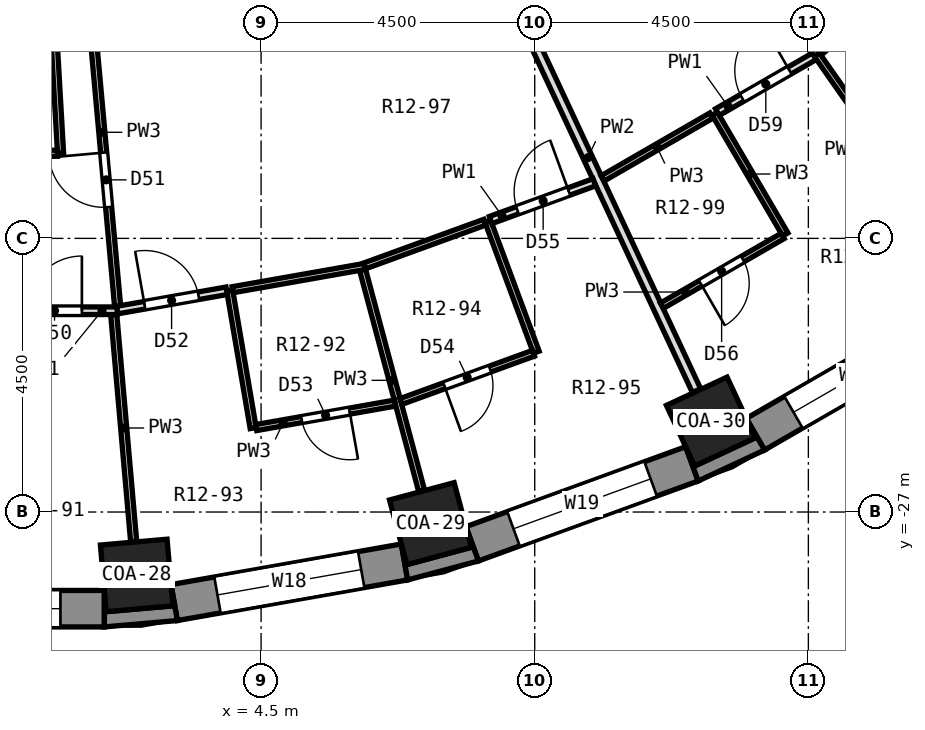
"""IFC4 building model, lengths in metres.
Left out: names, types, materials, properties, quantities, classifications, styles, units other than length and angle.
Written with IfcOpenShell. Run it as: python <this file> out.ifc"""

import sys

from ifc_helpers import new_model, si_unit, direction, frame, frame_2d, origin, origin_2d, place, context, subcontext, project, spatial, polyline, rectangle, outline, extrude, element, fill, save


model = new_model("IFC4")
c1 = context("Model", 3, precision=1e-05, world=origin(), true_north=direction((0.0, 1.0)))
c2 = subcontext(c1, "Body", "Model", "MODEL_VIEW")
j1 = project(units=[si_unit("LENGTHUNIT", "METRE"), si_unit("PLANEANGLEUNIT", "RADIAN")], contexts=[c1])
p1 = place(None, origin())
s1 = spatial("IfcSite", under=j1, at=p1, CompositionType="ELEMENT")
p2 = place(p1, origin())
s2 = spatial("IfcBuilding", under=s1, at=p2, CompositionType="ELEMENT")
p3 = place(p2, frame((0.0, 0.0, 56.0)))
s3 = spatial("IfcBuildingStorey", under=s2, at=p3, CompositionType="ELEMENT", Elevation=56.0)
for number, where, z_axis, x_axis in (
    (1, (2.453, -28.043, 0.0), (0.0, 0.0, 1.0), (0.087, -0.996, 0.0)),
    (2, (7.286, -27.191, 0.0), (0.0, 0.0, 1.0), (0.259, -0.966, 0.0)),
    (3, (11.897, -25.512, 0.0), (0.0, 0.0, 1.0), (0.423, -0.906, 0.0)),
):
    element("IfcColumn", number, at=place(p3, frame(where, z_axis=z_axis, x_axis=x_axis)), inside=s3, PredefinedType="COLUMN", context=c2, shape_type="SweptSolid", body=[
        extrude(rectangle(XDim=1.1, YDim=1.1, at=origin_2d()), origin(), (0.0, 0.0, 1.0), 3.3),
    ])
p4 = place(p3, frame((-1.923, -28.59, 0.0), z_axis=(0.0, 0.0, 1.0), x_axis=(1.0, 0.0, 0.0)))
e4 = element("IfcWall", 4, at=p4, inside=s3, PredefinedType="SOLIDWALL", context=c2, shape_type="SweptSolid", body=[
    extrude(rectangle(XDim=3.846, YDim=0.6, at=frame_2d((1.923, 0.0))), origin(), (0.0, 0.0, 1.0), 2.75),
])
p5 = place(p4, frame((0.723, 0.0, 0.9)))
e5 = element("IfcOpeningElement", 5, at=p5, cuts=e4, PredefinedType="OPENING", context=c2, shape_type="SweptSolid", body=[
    extrude(rectangle(XDim=2.4, YDim=1.8, at=frame_2d((1.2, 0.9))), frame((0.0, 0.312, 0.0), z_axis=(0.0, -1.0, 0.0), x_axis=(1.0, 0.0, 0.0)), (0.0, 0.0, 1.0), 0.624),
])
p6 = place(p3, frame((3.071, -28.489, 0.0), z_axis=(0.0, 0.0, 1.0), x_axis=(0.984800809218, 0.173687553279, 0.0)))
e6 = element("IfcWall", 6, at=p6, inside=s3, PredefinedType="SOLIDWALL", context=c2, shape_type="SweptSolid", body=[
    extrude(rectangle(XDim=3.846, YDim=0.6, at=frame_2d((1.923, 0.0))), origin(), (0.0, 0.0, 1.0), 2.75),
])
p7 = place(p6, frame((0.723, 0.0, 0.9)))
e7 = element("IfcOpeningElement", 7, at=p7, cuts=e6, PredefinedType="OPENING", context=c2, shape_type="SweptSolid", body=[
    extrude(rectangle(XDim=2.4, YDim=1.8, at=frame_2d((1.2, 0.9))), frame((0.0, 0.312, 0.0), z_axis=(0.0, -1.0, 0.0), x_axis=(1.0, 0.0, 0.0)), (0.0, 0.0, 1.0), 0.624),
])
p8 = place(p3, frame((7.971, -27.523, 0.0), z_axis=(0.0, 0.0, 1.0), x_axis=(0.939689588564, 0.342028474173, 0.0)))
e8 = element("IfcWall", 8, at=p8, inside=s3, PredefinedType="SOLIDWALL", context=c2, shape_type="SweptSolid", body=[
    extrude(rectangle(XDim=3.846, YDim=0.6, at=frame_2d((1.923, 0.0))), origin(), (0.0, 0.0, 1.0), 2.75),
])
p9 = place(p8, frame((0.723, 0.0, 0.9)))
e9 = element("IfcOpeningElement", 9, at=p9, cuts=e8, PredefinedType="OPENING", context=c2, shape_type="SweptSolid", body=[
    extrude(rectangle(XDim=2.4, YDim=1.8, at=frame_2d((1.2, 0.9))), frame((0.0, 0.312, 0.0), z_axis=(0.0, -1.0, 0.0), x_axis=(1.0, 0.0, 0.0)), (0.0, 0.0, 1.0), 0.624),
])
p10 = place(p3, frame((12.63, -25.721, 0.0), z_axis=(0.0, 0.0, 1.0), x_axis=(0.86603124159, 0.499989888488, 0.0)))
e10 = element("IfcWall", 10, at=p10, inside=s3, PredefinedType="SOLIDWALL", context=c2, shape_type="SweptSolid", body=[
    extrude(rectangle(XDim=3.846, YDim=0.6, at=frame_2d((1.923, 0.0))), origin(), (0.0, 0.0, 1.0), 2.75),
])
p11 = place(p10, frame((0.723, 0.0, 0.9)))
e11 = element("IfcOpeningElement", 11, at=p11, cuts=e10, PredefinedType="OPENING", context=c2, shape_type="SweptSolid", body=[
    extrude(rectangle(XDim=2.4, YDim=1.8, at=frame_2d((1.2, 0.9))), frame((0.0, 0.312, 0.0), z_axis=(0.0, -1.0, 0.0), x_axis=(1.0, 0.0, 0.0)), (0.0, 0.0, 1.0), 0.624),
])
p12 = place(p3, origin())
e12 = element("IfcWall", 12, at=p12, inside=s3, PredefinedType="SOLIDWALL", context=c2, shape_type="SweptSolid", body=[
    extrude(outline(polyline([(1.923, -28.89), (3.123, -28.785), (3.019, -28.194), (3.049, -28.543), (1.954, -28.639), (1.923, -28.29), (1.923, -28.89)])), origin(), (0.0, 0.0, 1.0), 2.75),
])
p13 = place(p3, origin())
e13 = element("IfcWall", 13, at=p13, inside=s3, PredefinedType="SOLIDWALL", context=c2, shape_type="SweptSolid", body=[
    extrude(outline(polyline([(6.91, -28.117), (8.074, -27.805), (7.869, -27.241), (7.959, -27.58), (6.897, -27.865), (6.806, -27.526), (6.91, -28.117)])), origin(), (0.0, 0.0, 1.0), 2.75),
])
p14 = place(p3, origin())
e14 = element("IfcWall", 14, at=p14, inside=s3, PredefinedType="SOLIDWALL", context=c2, shape_type="SweptSolid", body=[
    extrude(outline(polyline([(12.78, -25.981), (12.479, -25.461), (12.628, -25.779), (11.631, -26.243), (11.483, -25.926), (11.688, -26.49), (12.78, -25.981)])), origin(), (0.0, 0.0, 1.0), 2.75),
])
p15 = place(p3, frame((1.085, -19.062, 0.0), z_axis=(0.0, 0.0, 1.0), x_axis=(0.057060010535, -0.998370750372, 0.0)))
e15 = element("IfcWall", 15, at=p15, inside=s3, PredefinedType="PARTITIONING", context=c2, shape_type="SweptSolid", body=[
    extrude(rectangle(XDim=2.041, YDim=0.1, at=frame_2d((1.021, 0.0))), origin(), (0.0, 0.0, 1.0), 2.75),
])
p16 = place(p3, frame((2.077, -23.752, 0.0), z_axis=(0.0, 0.0, 1.0), x_axis=(0.087439331166, -0.996169846645, 0.0)))
e16 = element("IfcWall", 16, at=p16, inside=s3, PredefinedType="PARTITIONING", context=c2, shape_type="SweptSolid", body=[
    extrude(rectangle(XDim=3.747, YDim=0.1, at=frame_2d((1.874, 0.0))), origin(), (0.0, 0.0, 1.0), 2.75),
])
p17 = place(p3, frame((1.728, -19.062, 0.0), z_axis=(0.0, 0.0, 1.0), x_axis=(0.090314228744, -0.995913319565, 0.0)))
e17 = element("IfcWall", 17, at=p17, inside=s3, PredefinedType="PARTITIONING", context=c2, shape_type="SweptSolid", body=[
    extrude(rectangle(XDim=4.571, YDim=0.1, at=frame_2d((2.286, 0.0))), origin(), (0.0, 0.0, 1.0), 2.75),
])
p18 = place(p17, frame((2.036, 0.0, 0.0)))
e18 = element("IfcOpeningElement", 18, at=p18, cuts=e17, PredefinedType="OPENING", context=c2, shape_type="SweptSolid", body=[
    extrude(rectangle(XDim=0.9, YDim=2.1, at=frame_2d((0.45, 1.05))), frame((0.0, 0.062, 0.0), z_axis=(0.0, -1.0, 0.0), x_axis=(1.0, 0.0, 0.0)), (0.0, 0.0, 1.0), 0.124),
])
p19 = place(p3, frame((3.983, -23.353, 0.0), z_axis=(0.0, 0.0, 1.0), x_axis=(0.168356840278, -0.985726115273, 0.0)))
e19 = element("IfcWall", 19, at=p19, inside=s3, PredefinedType="PARTITIONING", context=c2, shape_type="SweptSolid", body=[
    extrude(rectangle(XDim=2.3, YDim=0.1, at=frame_2d((1.15, 0.0))), origin(), (0.0, 0.0, 1.0), 2.75),
])
p20 = place(p3, frame((6.169, -23.018, 0.0), z_axis=(0.0, 0.0, 1.0), x_axis=(0.258074907141, -0.966124910301, 0.0)))
e20 = element("IfcWall", 20, at=p20, inside=s3, PredefinedType="PARTITIONING", context=c2, shape_type="SweptSolid", body=[
    extrude(rectangle(XDim=3.76, YDim=0.1, at=frame_2d((1.88, 0.0))), origin(), (0.0, 0.0, 1.0), 2.75),
])
p21 = place(p3, frame((8.227, -22.216, 0.0), z_axis=(0.0, 0.0, 1.0), x_axis=(0.347431936108, -0.937705204087, 0.0)))
e21 = element("IfcWall", 21, at=p21, inside=s3, PredefinedType="PARTITIONING", context=c2, shape_type="SweptSolid", body=[
    extrude(rectangle(XDim=2.299, YDim=0.1, at=frame_2d((1.15, 0.0))), origin(), (0.0, 0.0, 1.0), 2.75),
])
p22 = place(p3, frame((8.086, -17.343, 0.0), z_axis=(0.0, 0.0, 1.0), x_axis=(0.422898111985, -0.906177238116, 0.0)))
e22 = element("IfcWall", 22, at=p22, inside=s3, PredefinedType="PARTITIONING", context=c2, shape_type="SweptSolid", body=[
    extrude(rectangle(XDim=8.455, YDim=0.15, at=frame_2d((4.227, 0.0))), origin(), (0.0, 0.0, 1.0), 2.75),
])
p23 = place(p3, frame((11.96, -20.449, 0.0), z_axis=(0.0, 0.0, 1.0), x_axis=(0.504708754908, -0.863289680651, 0.0)))
e23 = element("IfcWall", 23, at=p23, inside=s3, PredefinedType="PARTITIONING", context=c2, shape_type="SweptSolid", body=[
    extrude(rectangle(XDim=2.301, YDim=0.1, at=frame_2d((1.15, 0.0))), origin(), (0.0, 0.0, 1.0), 2.75),
])
p24 = place(p3, frame((13.64, -19.48, 0.0), z_axis=(0.0, 0.0, 1.0), x_axis=(0.573574167811, -0.819153632733, 0.0)))
e24 = element("IfcWall", 24, at=p24, inside=s3, PredefinedType="PARTITIONING", context=c2, shape_type="SweptSolid", body=[
    extrude(rectangle(XDim=3.81, YDim=0.1, at=frame_2d((1.905, 0.0))), origin(), (0.0, 0.0, 1.0), 2.75),
])
p25 = place(p3, frame((0.183, -23.69, 0.0), z_axis=(0.0, 0.0, 1.0), x_axis=(1.0, 0.0, 0.0)))
e25 = element("IfcWall", 25, at=p25, inside=s3, PredefinedType="PARTITIONING", context=c2, shape_type="SweptSolid", body=[
    extrude(rectangle(XDim=1.953, YDim=0.125, at=frame_2d((0.977, 0.0))), origin(), (0.0, 0.0, 1.0), 2.75),
])
p26 = place(p25, frame((0.47, 0.0, 0.0)))
e26 = element("IfcOpeningElement", 26, at=p26, cuts=e25, PredefinedType="OPENING", context=c2, shape_type="SweptSolid", body=[
    extrude(rectangle(XDim=0.9, YDim=2.1, at=frame_2d((0.45, 1.05))), frame((0.0, 0.074, 0.0), z_axis=(0.0, -1.0, 0.0), x_axis=(1.0, 0.0, 0.0)), (0.0, 0.0, 1.0), 0.149),
])
p27 = place(p3, frame((-0.921, -21.1, 0.0), z_axis=(0.0, 0.0, 1.0), x_axis=(1.0, 0.0, 0.0)))
e27 = element("IfcWall", 27, at=p27, inside=s3, PredefinedType="PARTITIONING", context=c2, shape_type="SweptSolid", body=[
    extrude(rectangle(XDim=2.073, YDim=0.1, at=frame_2d((1.037, 0.0))), origin(), (0.0, 0.0, 1.0), 2.75),
])
p28 = place(p27, frame((0.662, 0.0, 0.0)))
e28 = element("IfcOpeningElement", 28, at=p28, cuts=e27, PredefinedType="OPENING", context=c2, shape_type="SweptSolid", body=[
    extrude(rectangle(XDim=0.8, YDim=2.1, at=frame_2d((0.4, 1.05))), frame((0.0, 0.062, 0.0), z_axis=(0.0, -1.0, 0.0), x_axis=(1.0, 0.0, 0.0)), (0.0, 0.0, 1.0), 0.124),
])
p29 = place(p3, frame((4.419, -25.611, 0.0), z_axis=(0.0, 0.0, 1.0), x_axis=(0.984814280308, 0.173611155466, 0.0)))
e29 = element("IfcWall", 29, at=p29, inside=s3, PredefinedType="PARTITIONING", context=c2, shape_type="SweptSolid", body=[
    extrude(rectangle(XDim=2.319, YDim=0.1, at=frame_2d((1.159, 0.0))), origin(), (0.0, 0.0, 1.0), 2.75),
])
p30 = place(p29, frame((0.76, 0.0, 0.0)))
e30 = element("IfcOpeningElement", 30, at=p30, cuts=e29, PredefinedType="OPENING", context=c2, shape_type="SweptSolid", body=[
    extrude(rectangle(XDim=0.8, YDim=2.1, at=frame_2d((0.4, 1.05))), frame((0.0, 0.062, 0.0), z_axis=(0.0, -1.0, 0.0), x_axis=(1.0, 0.0, 0.0)), (0.0, 0.0, 1.0), 0.124),
])
p31 = place(p3, frame((4.032, -23.344, 0.0), z_axis=(0.0, 0.0, 1.0), x_axis=(0.98481362095, 0.173614895648, 0.0)))
e31 = element("IfcWall", 31, at=p31, inside=s3, PredefinedType="PARTITIONING", context=c2, shape_type="SweptSolid", body=[
    extrude(rectangle(XDim=2.206, YDim=0.1, at=frame_2d((1.103, 0.0))), origin(), (0.0, 0.0, 1.0), 2.75),
])
p32 = place(p3, frame((2.135, -23.679, 0.0), z_axis=(0.0, 0.0, 1.0), x_axis=(0.984774141248, 0.173838691691, 0.0)))
e32 = element("IfcWall", 32, at=p32, inside=s3, PredefinedType="PARTITIONING", context=c2, shape_type="SweptSolid", body=[
    extrude(rectangle(XDim=1.827, YDim=0.125, at=frame_2d((0.914, 0.0))), origin(), (0.0, 0.0, 1.0), 2.75),
])
p33 = place(p32, frame((0.457, 0.0, 0.0)))
e33 = element("IfcOpeningElement", 33, at=p33, cuts=e32, PredefinedType="OPENING", context=c2, shape_type="SweptSolid", body=[
    extrude(rectangle(XDim=0.9, YDim=2.1, at=frame_2d((0.45, 1.05))), frame((0.0, 0.074, 0.0), z_axis=(0.0, -1.0, 0.0), x_axis=(1.0, 0.0, 0.0)), (0.0, 0.0, 1.0), 0.149),
])
p34 = place(p3, frame((6.799, -25.183, 0.0), z_axis=(0.0, 0.0, 1.0), x_axis=(0.939655079874, 0.342123268526, 0.0)))
e34 = element("IfcWall", 34, at=p34, inside=s3, PredefinedType="PARTITIONING", context=c2, shape_type="SweptSolid", body=[
    extrude(rectangle(XDim=2.32, YDim=0.1, at=frame_2d((1.16, 0.0))), origin(), (0.0, 0.0, 1.0), 2.75),
])
p35 = place(p34, frame((0.76, 0.0, 0.0)))
e35 = element("IfcOpeningElement", 35, at=p35, cuts=e34, PredefinedType="OPENING", context=c2, shape_type="SweptSolid", body=[
    extrude(rectangle(XDim=0.8, YDim=2.1, at=frame_2d((0.4, 1.05))), frame((0.0, 0.062, 0.0), z_axis=(0.0, -1.0, 0.0), x_axis=(1.0, 0.0, 0.0)), (0.0, 0.0, 1.0), 0.124),
])
p36 = place(p3, frame((6.202, -22.953, 0.0), z_axis=(0.0, 0.0, 1.0), x_axis=(0.939725675468, 0.341929312674, 0.0)))
e36 = element("IfcWall", 36, at=p36, inside=s3, PredefinedType="PARTITIONING", context=c2, shape_type="SweptSolid", body=[
    extrude(rectangle(XDim=2.105, YDim=0.1, at=frame_2d((1.052, 0.0))), origin(), (0.0, 0.0, 1.0), 2.75),
])
p37 = place(p3, frame((8.274, -22.199, 0.0), z_axis=(0.0, 0.0, 1.0), x_axis=(0.939592989856, 0.342293753104, 0.0)))
e37 = element("IfcWall", 37, at=p37, inside=s3, PredefinedType="PARTITIONING", context=c2, shape_type="SweptSolid", body=[
    extrude(rectangle(XDim=1.815, YDim=0.125, at=frame_2d((0.908, 0.0))), origin(), (0.0, 0.0, 1.0), 2.75),
])
p38 = place(p37, frame((0.47, 0.0, 0.0)))
e38 = element("IfcOpeningElement", 38, at=p38, cuts=e37, PredefinedType="OPENING", context=c2, shape_type="SweptSolid", body=[
    extrude(rectangle(XDim=0.9, YDim=2.1, at=frame_2d((0.45, 1.05))), frame((0.0, 0.074, 0.0), z_axis=(0.0, -1.0, 0.0), x_axis=(1.0, 0.0, 0.0)), (0.0, 0.0, 1.0), 0.149),
])
p39 = place(p3, frame((12.003, -20.424, 0.0), z_axis=(0.0, 0.0, 1.0), x_axis=(0.866538954681, 0.499109446936, 0.0)))
e39 = element("IfcWall", 39, at=p39, inside=s3, PredefinedType="PARTITIONING", context=c2, shape_type="SweptSolid", body=[
    extrude(rectangle(XDim=1.839, YDim=0.125, at=frame_2d((0.919, 0.0))), origin(), (0.0, 0.0, 1.0), 2.75),
])
p40 = place(p39, frame((0.47, 0.0, 0.0)))
e40 = element("IfcOpeningElement", 40, at=p40, cuts=e39, PredefinedType="OPENING", context=c2, shape_type="SweptSolid", body=[
    extrude(rectangle(XDim=0.9, YDim=2.1, at=frame_2d((0.45, 1.05))), frame((0.0, 0.074, 0.0), z_axis=(0.0, -1.0, 0.0), x_axis=(1.0, 0.0, 0.0)), (0.0, 0.0, 1.0), 0.149),
])
p41 = place(p3, frame((11.091, -23.607, 0.0), z_axis=(0.0, 0.0, 1.0), x_axis=(0.865928578621, 0.500167668615, 0.0)))
e41 = element("IfcWall", 41, at=p41, inside=s3, PredefinedType="PARTITIONING", context=c2, shape_type="SweptSolid", body=[
    extrude(rectangle(XDim=2.294, YDim=0.1, at=frame_2d((1.147, 0.0))), origin(), (0.0, 0.0, 1.0), 2.75),
])
p42 = place(p41, frame((0.735, 0.0, 0.0)))
e42 = element("IfcOpeningElement", 42, at=p42, cuts=e41, PredefinedType="OPENING", context=c2, shape_type="SweptSolid", body=[
    extrude(rectangle(XDim=0.8, YDim=2.1, at=frame_2d((0.4, 1.05))), frame((0.0, 0.062, 0.0), z_axis=(0.0, -1.0, 0.0), x_axis=(1.0, 0.0, 0.0)), (0.0, 0.0, 1.0), 0.124),
])
p43 = place(p3, frame((10.115, -21.514, 0.0), z_axis=(0.0, 0.0, 1.0), x_axis=(0.865967335607, 0.500100563549, 0.0)))
e43 = element("IfcWall", 43, at=p43, inside=s3, PredefinedType="PARTITIONING", context=c2, shape_type="SweptSolid", body=[
    extrude(rectangle(XDim=2.068, YDim=0.1, at=frame_2d((1.034, 0.0))), origin(), (0.0, 0.0, 1.0), 2.75),
])
p44 = place(p3, frame((13.688, -19.44, 0.0), z_axis=(0.0, 0.0, 1.0), x_axis=(0.765911671875, 0.642945807114, 0.0)))
e44 = element("IfcWall", 44, at=p44, inside=s3, PredefinedType="PARTITIONING", context=c2, shape_type="SweptSolid", body=[
    extrude(rectangle(XDim=2.093, YDim=0.1, at=frame_2d((1.046, 0.0))), origin(), (0.0, 0.0, 1.0), 2.75),
])
p45 = place(p5, origin())
e45 = element("IfcWindow", 45, at=p45, inside=s3, PartitioningType="SINGLE_PANEL", PredefinedType="WINDOW", context=c2, shape_type="SweptSolid", body=[
    extrude(rectangle(XDim=2.4, YDim=1.8, at=frame_2d((1.2, 0.9))), frame((0.0, 0.18, 0.0), z_axis=(0.0, -1.0, 0.0), x_axis=(1.0, 0.0, 0.0)), (0.0, 0.0, 1.0), 0.06),
])
fill(e5, e45)
p46 = place(p7, origin())
e46 = element("IfcWindow", 46, at=p46, inside=s3, PartitioningType="SINGLE_PANEL", PredefinedType="WINDOW", context=c2, shape_type="SweptSolid", body=[
    extrude(rectangle(XDim=2.4, YDim=1.8, at=frame_2d((1.2, 0.9))), frame((0.0, 0.18, 0.0), z_axis=(0.0, -1.0, 0.0), x_axis=(1.0, 0.0, 0.0)), (0.0, 0.0, 1.0), 0.06),
])
fill(e7, e46)
p47 = place(p9, origin())
e47 = element("IfcWindow", 47, at=p47, inside=s3, PartitioningType="SINGLE_PANEL", PredefinedType="WINDOW", context=c2, shape_type="SweptSolid", body=[
    extrude(rectangle(XDim=2.4, YDim=1.8, at=frame_2d((1.2, 0.9))), frame((0.0, 0.18, 0.0), z_axis=(0.0, -1.0, 0.0), x_axis=(1.0, 0.0, 0.0)), (0.0, 0.0, 1.0), 0.06),
])
fill(e9, e47)
p48 = place(p11, origin())
e48 = element("IfcWindow", 48, at=p48, inside=s3, PartitioningType="SINGLE_PANEL", PredefinedType="WINDOW", context=c2, shape_type="SweptSolid", body=[
    extrude(rectangle(XDim=2.4, YDim=1.8, at=frame_2d((1.2, 0.9))), frame((0.0, 0.18, 0.0), z_axis=(0.0, -1.0, 0.0), x_axis=(1.0, 0.0, 0.0)), (0.0, 0.0, 1.0), 0.06),
])
fill(e11, e48)
p49 = place(p26, origin())
e49 = element("IfcDoor", 49, at=p49, inside=s3, OperationType="SINGLE_SWING_RIGHT", PredefinedType="DOOR", context=c2, shape_type="SweptSolid", body=[
    extrude(rectangle(XDim=0.9, YDim=2.1, at=frame_2d((0.45, 1.05))), frame((0.0, 0.025, 0.0), z_axis=(0.0, -1.0, 0.0), x_axis=(1.0, 0.0, 0.0)), (0.0, 0.0, 1.0), 0.05),
])
fill(e26, e49)
p50 = place(p18, frame((0.9, 0.0, 0.0), z_axis=(0.0, 0.0, 1.0), x_axis=(-1.0, 0.0, 0.0)))
e50 = element("IfcDoor", 50, at=p50, inside=s3, OperationType="SINGLE_SWING_RIGHT", PredefinedType="DOOR", context=c2, shape_type="SweptSolid", body=[
    extrude(rectangle(XDim=0.9, YDim=2.1, at=frame_2d((0.45, 1.05))), frame((0.0, 0.025, 0.0), z_axis=(0.0, -1.0, 0.0), x_axis=(1.0, 0.0, 0.0)), (0.0, 0.0, 1.0), 0.05),
])
fill(e18, e50)
p51 = place(p33, origin())
e51 = element("IfcDoor", 51, at=p51, inside=s3, OperationType="SINGLE_SWING_LEFT", PredefinedType="DOOR", context=c2, shape_type="SweptSolid", body=[
    extrude(rectangle(XDim=0.9, YDim=2.1, at=frame_2d((0.45, 1.05))), frame((0.0, 0.025, 0.0), z_axis=(0.0, -1.0, 0.0), x_axis=(1.0, 0.0, 0.0)), (0.0, 0.0, 1.0), 0.05),
])
fill(e33, e51)
p52 = place(p30, frame((0.8, 0.0, 0.0), z_axis=(0.0, 0.0, 1.0), x_axis=(-1.0, 0.0, 0.0)))
e52 = element("IfcDoor", 52, at=p52, inside=s3, OperationType="SINGLE_SWING_LEFT", PredefinedType="DOOR", context=c2, shape_type="SweptSolid", body=[
    extrude(rectangle(XDim=0.8, YDim=2.1, at=frame_2d((0.4, 1.05))), frame((0.0, 0.025, 0.0), z_axis=(0.0, -1.0, 0.0), x_axis=(1.0, 0.0, 0.0)), (0.0, 0.0, 1.0), 0.05),
])
fill(e30, e52)
p53 = place(p35, frame((0.8, 0.0, 0.0), z_axis=(0.0, 0.0, 1.0), x_axis=(-1.0, 0.0, 0.0)))
e53 = element("IfcDoor", 53, at=p53, inside=s3, OperationType="SINGLE_SWING_RIGHT", PredefinedType="DOOR", context=c2, shape_type="SweptSolid", body=[
    extrude(rectangle(XDim=0.8, YDim=2.1, at=frame_2d((0.4, 1.05))), frame((0.0, 0.025, 0.0), z_axis=(0.0, -1.0, 0.0), x_axis=(1.0, 0.0, 0.0)), (0.0, 0.0, 1.0), 0.05),
])
fill(e35, e53)
p54 = place(p38, origin())
e54 = element("IfcDoor", 54, at=p54, inside=s3, OperationType="SINGLE_SWING_RIGHT", PredefinedType="DOOR", context=c2, shape_type="SweptSolid", body=[
    extrude(rectangle(XDim=0.9, YDim=2.1, at=frame_2d((0.45, 1.05))), frame((0.0, 0.025, 0.0), z_axis=(0.0, -1.0, 0.0), x_axis=(1.0, 0.0, 0.0)), (0.0, 0.0, 1.0), 0.05),
])
fill(e38, e54)
p55 = place(p42, frame((0.8, 0.0, 0.0), z_axis=(0.0, 0.0, 1.0), x_axis=(-1.0, 0.0, 0.0)))
e55 = element("IfcDoor", 55, at=p55, inside=s3, OperationType="SINGLE_SWING_RIGHT", PredefinedType="DOOR", context=c2, shape_type="SweptSolid", body=[
    extrude(rectangle(XDim=0.8, YDim=2.1, at=frame_2d((0.4, 1.05))), frame((0.0, 0.025, 0.0), z_axis=(0.0, -1.0, 0.0), x_axis=(1.0, 0.0, 0.0)), (0.0, 0.0, 1.0), 0.05),
])
fill(e42, e55)
p56 = place(p40, origin())
e56 = element("IfcDoor", 56, at=p56, inside=s3, OperationType="SINGLE_SWING_RIGHT", PredefinedType="DOOR", context=c2, shape_type="SweptSolid", body=[
    extrude(rectangle(XDim=0.9, YDim=2.1, at=frame_2d((0.45, 1.05))), frame((0.0, 0.025, 0.0), z_axis=(0.0, -1.0, 0.0), x_axis=(1.0, 0.0, 0.0)), (0.0, 0.0, 1.0), 0.05),
])
fill(e40, e56)
save(model, sys.argv[1])
